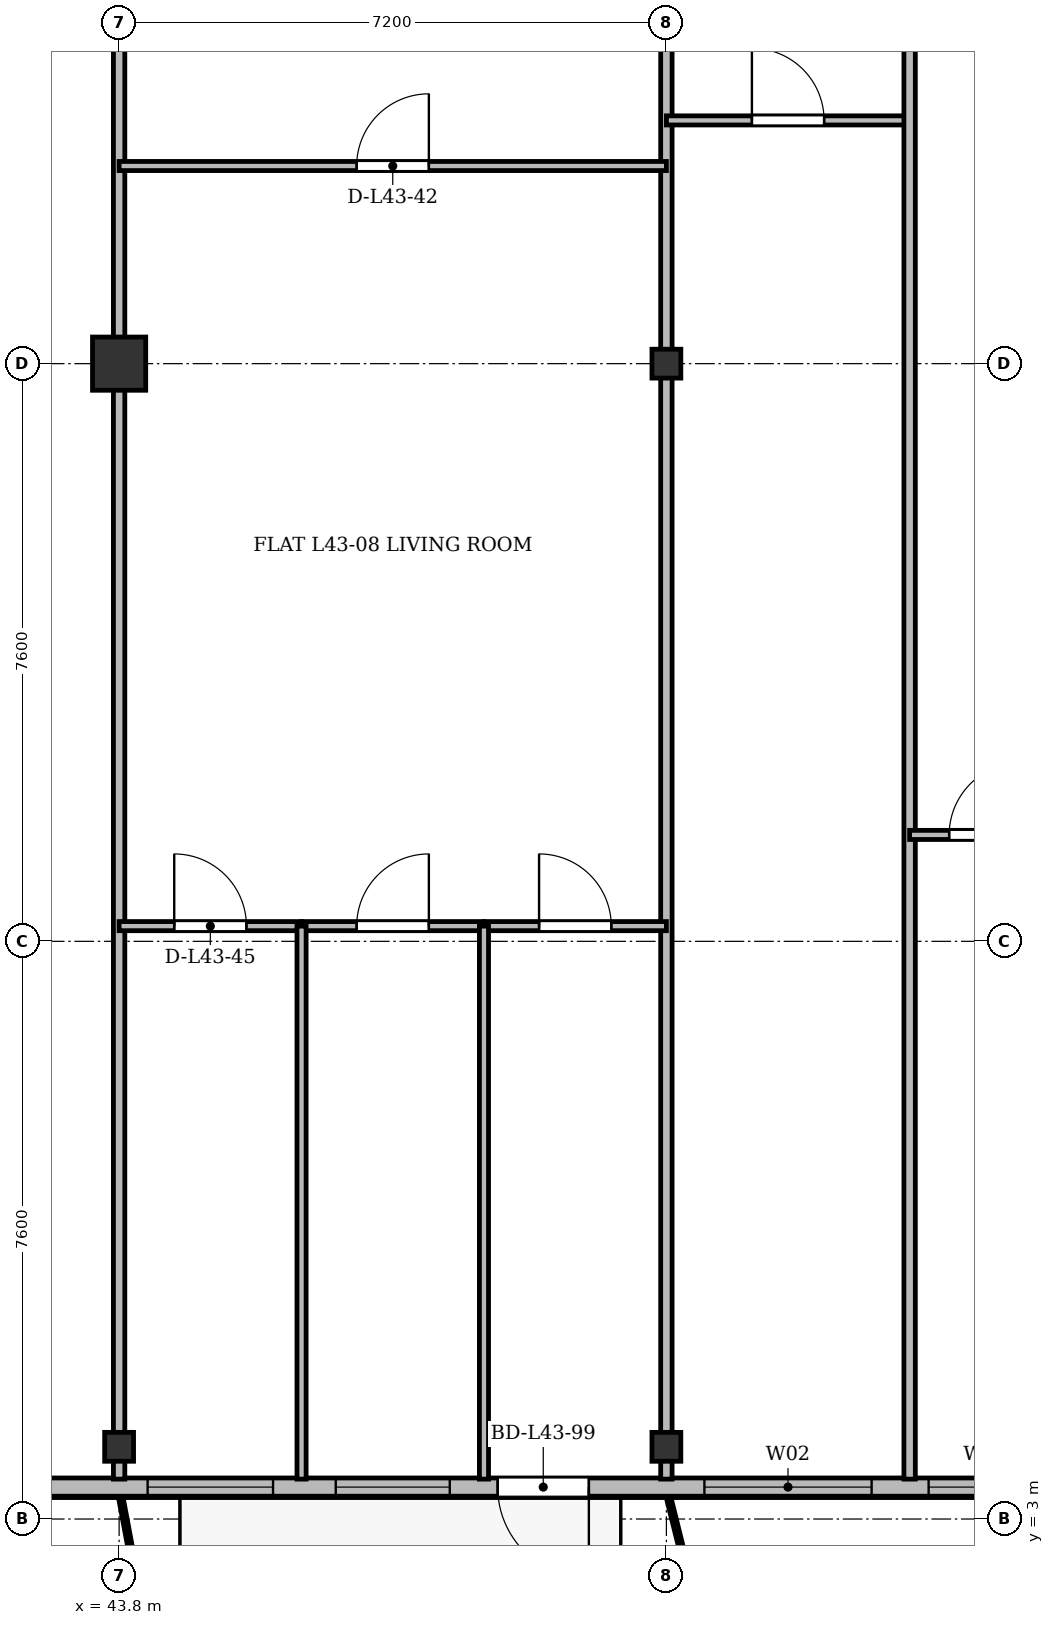
"""IFC4 building model, lengths in metres.
Left out: names, types, materials, properties, quantities, classifications, styles, units other than length and angle.
Written with IfcOpenShell. Run it as: python <this file> out.ifc"""

import sys

from ifc_helpers import new_model, si_unit, direction, frame, frame_2d, origin, origin_2d, place, context, subcontext, project, spatial, rectangle, i_section, extrude, source, transform, mapped, element, fill, save


model = new_model("IFC4")
c1 = context("Model", 3, precision=1e-05, world=origin(), true_north=direction((0.0, 1.0)))
c2 = subcontext(c1, "Body", "Model", "MODEL_VIEW")
j1 = project(units=[si_unit("LENGTHUNIT", "METRE"), si_unit("PLANEANGLEUNIT", "RADIAN")], contexts=[c1])
p1 = place(None, origin())
s1 = spatial("IfcSite", under=j1, at=p1, CompositionType="ELEMENT")
p2 = place(p1, origin())
s2 = spatial("IfcBuilding", under=s1, at=p2, CompositionType="ELEMENT")
p3 = place(p2, frame((0.0, 0.0, 164.5)))
s3 = spatial("IfcBuildingStorey", under=s2, at=p3, CompositionType="ELEMENT", Elevation=164.5)
m1 = source(origin(), c2, "Body", "SweptSolid", [
    extrude(i_section(OverallWidth=0.38, OverallDepth=0.38, WebThickness=0.02, FlangeThickness=0.03, at=origin_2d()), origin(), (0.0, 0.0, 1.0), 3.6),
])
p4 = place(p3, frame((43.8, 3.95, 0.0), z_axis=(0.0, 0.0, 1.0), x_axis=(1.0, 0.0, 0.0)))
e1 = element("IfcColumn", 1, at=p4, inside=s3, PredefinedType="COLUMN", context=c2, shape_type="MappedRepresentation", body=[
    mapped(m1, transform((0.0, 0.0, 0.0), x_axis=(1.0, 0.0, 0.0), y_axis=(0.0, 1.0, 0.0), z_axis=(0.0, 0.0, 1.0), scale=1.0)),
])
m2 = source(origin(), c2, "Body", "SweptSolid", [
    extrude(rectangle(XDim=0.7, YDim=0.7, at=origin_2d()), origin(), (0.0, 0.0, 1.0), 3.6),
])
p5 = place(p3, frame((43.8, 18.2, 0.0), z_axis=(0.0, 0.0, 1.0), x_axis=(1.0, 0.0, 0.0)))
e2 = element("IfcColumn", 2, at=p5, inside=s3, PredefinedType="COLUMN", context=c2, shape_type="MappedRepresentation", body=[
    mapped(m2, transform((0.0, 0.0, 0.0), x_axis=(1.0, 0.0, 0.0), y_axis=(0.0, 1.0, 0.0), z_axis=(0.0, 0.0, 1.0), scale=1.0)),
])
for number, where, z_axis, x_axis in (
    (3, (51.0, 3.95, 0.0), (0.0, 0.0, 1.0), (1.0, 0.0, 0.0)),
    (4, (51.0, 18.2, 0.0), (0.0, 0.0, 1.0), (1.0, 0.0, 0.0)),
):
    element("IfcColumn", number, at=place(p3, frame(where, z_axis=z_axis, x_axis=x_axis)), inside=s3, PredefinedType="COLUMN", context=c2, shape_type="MappedRepresentation", body=[
        mapped(m1, transform((0.0, 0.0, 0.0), x_axis=(1.0, 0.0, 0.0), y_axis=(0.0, 1.0, 0.0), z_axis=(0.0, 0.0, 1.0), scale=1.0)),
    ])
p6 = place(p3, frame((63.6, 3.42, 0.0), z_axis=(0.0, 0.0, 1.0), x_axis=(-1.0, 0.0, 0.0)))
e5 = element("IfcWall", 5, at=p6, inside=s3, PredefinedType="SOLIDWALL", context=c2, shape_type="SweptSolid", body=[
    extrude(rectangle(XDim=52.8, YDim=0.24, at=frame_2d((26.4, 0.0))), origin(), (0.0, 0.0, 1.0), 3.35),
])
p7 = place(p6, frame((1.445, 0.0, 0.9)))
e6 = element("IfcOpeningElement", 6, at=p7, cuts=e5, PredefinedType="OPENING", context=c2, shape_type="SweptSolid", body=[
    extrude(rectangle(XDim=2.0, YDim=1.95, at=frame_2d((1.0, 0.975))), frame((0.0, 0.13, 0.0), z_axis=(0.0, -1.0, 0.0), x_axis=(1.0, 0.0, 0.0)), (0.0, 0.0, 1.0), 0.26),
])
p8 = place(p6, frame((5.275, 0.0, 0.9)))
e7 = element("IfcOpeningElement", 7, at=p8, cuts=e5, PredefinedType="OPENING", context=c2, shape_type="SweptSolid", body=[
    extrude(rectangle(XDim=1.65, YDim=1.85, at=frame_2d((0.825, 0.925))), frame((0.0, 0.13, 0.0), z_axis=(0.0, -1.0, 0.0), x_axis=(1.0, 0.0, 0.0)), (0.0, 0.0, 1.0), 0.26),
])
p9 = place(p6, frame((7.65, 0.0, 0.9)))
e8 = element("IfcOpeningElement", 8, at=p9, cuts=e5, PredefinedType="OPENING", context=c2, shape_type="SweptSolid", body=[
    extrude(rectangle(XDim=1.5, YDim=1.75, at=frame_2d((0.75, 0.875))), frame((0.0, 0.13, 0.0), z_axis=(0.0, -1.0, 0.0), x_axis=(1.0, 0.0, 0.0)), (0.0, 0.0, 1.0), 0.26),
])
p10 = place(p6, frame((9.9, 0.0, 0.9)))
e9 = element("IfcOpeningElement", 9, at=p10, cuts=e5, PredefinedType="OPENING", context=c2, shape_type="SweptSolid", body=[
    extrude(rectangle(XDim=2.2, YDim=1.8, at=frame_2d((1.1, 0.9))), frame((0.0, 0.13, 0.0), z_axis=(0.0, -1.0, 0.0), x_axis=(1.0, 0.0, 0.0)), (0.0, 0.0, 1.0), 0.26),
])
p11 = place(p6, frame((13.62, 0.0, 0.0)))
e10 = element("IfcOpeningElement", 10, at=p11, cuts=e5, PredefinedType="OPENING", context=c2, shape_type="SweptSolid", body=[
    extrude(rectangle(XDim=1.2, YDim=2.2, at=frame_2d((0.6, 1.1))), frame((0.0, 0.13, 0.0), z_axis=(0.0, -1.0, 0.0), x_axis=(1.0, 0.0, 0.0)), (0.0, 0.0, 1.0), 0.26),
])
p12 = place(p6, frame((15.45, 0.0, 0.9)))
e11 = element("IfcOpeningElement", 11, at=p12, cuts=e5, PredefinedType="OPENING", context=c2, shape_type="SweptSolid", body=[
    extrude(rectangle(XDim=1.5, YDim=1.75, at=frame_2d((0.75, 0.875))), frame((0.0, 0.13, 0.0), z_axis=(0.0, -1.0, 0.0), x_axis=(1.0, 0.0, 0.0)), (0.0, 0.0, 1.0), 0.26),
])
p13 = place(p6, frame((17.775, 0.0, 0.9)))
e12 = element("IfcOpeningElement", 12, at=p13, cuts=e5, PredefinedType="OPENING", context=c2, shape_type="SweptSolid", body=[
    extrude(rectangle(XDim=1.65, YDim=1.85, at=frame_2d((0.825, 0.925))), frame((0.0, 0.13, 0.0), z_axis=(0.0, -1.0, 0.0), x_axis=(1.0, 0.0, 0.0)), (0.0, 0.0, 1.0), 0.26),
])
p14 = place(p6, frame((22.2, 0.0, 0.9)))
e13 = element("IfcOpeningElement", 13, at=p14, cuts=e5, PredefinedType="OPENING", context=c2, shape_type="SweptSolid", body=[
    extrude(rectangle(XDim=1.8, YDim=1.8, at=frame_2d((0.9, 0.9))), frame((0.0, 0.13, 0.0), z_axis=(0.0, -1.0, 0.0), x_axis=(1.0, 0.0, 0.0)), (0.0, 0.0, 1.0), 0.26),
])
p15 = place(p6, frame((28.6, 0.0, 0.9)))
e14 = element("IfcOpeningElement", 14, at=p15, cuts=e5, PredefinedType="OPENING", context=c2, shape_type="SweptSolid", body=[
    extrude(rectangle(XDim=2.2, YDim=1.8, at=frame_2d((1.1, 0.9))), frame((0.0, 0.13, 0.0), z_axis=(0.0, -1.0, 0.0), x_axis=(1.0, 0.0, 0.0)), (0.0, 0.0, 1.0), 0.26),
])
p16 = place(p6, frame((35.85, 0.0, 0.9)))
e15 = element("IfcOpeningElement", 15, at=p16, cuts=e5, PredefinedType="OPENING", context=c2, shape_type="SweptSolid", body=[
    extrude(rectangle(XDim=1.5, YDim=1.75, at=frame_2d((0.75, 0.875))), frame((0.0, 0.13, 0.0), z_axis=(0.0, -1.0, 0.0), x_axis=(1.0, 0.0, 0.0)), (0.0, 0.0, 1.0), 0.26),
])
p17 = place(p6, frame((41.656, 0.0, 0.0)))
e16 = element("IfcOpeningElement", 16, at=p17, cuts=e5, PredefinedType="OPENING", context=c2, shape_type="SweptSolid", body=[
    extrude(rectangle(XDim=1.2, YDim=2.2, at=frame_2d((0.6, 1.1))), frame((0.0, 0.13, 0.0), z_axis=(0.0, -1.0, 0.0), x_axis=(1.0, 0.0, 0.0)), (0.0, 0.0, 1.0), 0.26),
])
p18 = place(p6, frame((43.65, 0.0, 0.9)))
e17 = element("IfcOpeningElement", 17, at=p18, cuts=e5, PredefinedType="OPENING", context=c2, shape_type="SweptSolid", body=[
    extrude(rectangle(XDim=1.5, YDim=1.75, at=frame_2d((0.75, 0.875))), frame((0.0, 0.13, 0.0), z_axis=(0.0, -1.0, 0.0), x_axis=(1.0, 0.0, 0.0)), (0.0, 0.0, 1.0), 0.26),
])
p19 = place(p6, frame((45.8, 0.0, 0.9)))
e18 = element("IfcOpeningElement", 18, at=p19, cuts=e5, PredefinedType="OPENING", context=c2, shape_type="SweptSolid", body=[
    extrude(rectangle(XDim=1.8, YDim=1.8, at=frame_2d((0.9, 0.9))), frame((0.0, 0.13, 0.0), z_axis=(0.0, -1.0, 0.0), x_axis=(1.0, 0.0, 0.0)), (0.0, 0.0, 1.0), 0.26),
])
p20 = place(p6, frame((49.255, 0.0, 0.9)))
e19 = element("IfcOpeningElement", 19, at=p20, cuts=e5, PredefinedType="OPENING", context=c2, shape_type="SweptSolid", body=[
    extrude(rectangle(XDim=2.2, YDim=1.8, at=frame_2d((1.1, 0.9))), frame((0.0, 0.13, 0.0), z_axis=(0.0, -1.0, 0.0), x_axis=(1.0, 0.0, 0.0)), (0.0, 0.0, 1.0), 0.26),
])
for number, where, z_axis, x_axis in (
    (20, (43.8, 3.525, 0.0), (0.0, 0.0, 1.0), (0.0, 1.0, 0.0)),
    (21, (51.0, 3.525, 0.0), (0.0, 0.0, 1.0), (0.0, 1.0, 0.0)),
):
    element("IfcWall", number, at=place(p3, frame(where, z_axis=z_axis, x_axis=x_axis)), inside=s3, PredefinedType="PARTITIONING", context=c2, shape_type="SweptSolid", body=[
        extrude(rectangle(XDim=27.275, YDim=0.15, at=frame_2d((13.638, 0.0))), origin(), (0.0, 0.0, 1.0), 2.85),
    ])
p21 = place(p3, frame((43.8, 20.8, 0.0), z_axis=(0.0, 0.0, 1.0), x_axis=(1.0, 0.0, 0.0)))
e22 = element("IfcWall", 22, at=p21, inside=s3, PredefinedType="PARTITIONING", context=c2, shape_type="SweptSolid", body=[
    extrude(rectangle(XDim=7.2, YDim=0.12, at=frame_2d((3.6, 0.0))), origin(), (0.0, 0.0, 1.0), 2.85),
])
p22 = place(p21, frame((3.125, 0.0, 0.0)))
e23 = element("IfcOpeningElement", 23, at=p22, cuts=e22, PredefinedType="OPENING", context=c2, shape_type="SweptSolid", body=[
    extrude(rectangle(XDim=0.95, YDim=2.15, at=frame_2d((0.475, 1.075))), frame((0.0, 0.07, 0.0), z_axis=(0.0, -1.0, 0.0), x_axis=(1.0, 0.0, 0.0)), (0.0, 0.0, 1.0), 0.14),
])
p23 = place(p3, frame((43.8, 10.8, 0.0), z_axis=(0.0, 0.0, 1.0), x_axis=(1.0, 0.0, 0.0)))
e24 = element("IfcWall", 24, at=p23, inside=s3, PredefinedType="PARTITIONING", context=c2, shape_type="SweptSolid", body=[
    extrude(rectangle(XDim=2.4, YDim=0.12, at=frame_2d((1.2, 0.0))), origin(), (0.0, 0.0, 1.0), 2.85),
])
p24 = place(p23, frame((0.725, 0.0, 0.0)))
e25 = element("IfcOpeningElement", 25, at=p24, cuts=e24, PredefinedType="OPENING", context=c2, shape_type="SweptSolid", body=[
    extrude(rectangle(XDim=0.95, YDim=2.15, at=frame_2d((0.475, 1.075))), frame((0.0, 0.07, 0.0), z_axis=(0.0, -1.0, 0.0), x_axis=(1.0, 0.0, 0.0)), (0.0, 0.0, 1.0), 0.14),
])
p25 = place(p3, frame((46.2, 10.8, 0.0), z_axis=(0.0, 0.0, 1.0), x_axis=(1.0, 0.0, 0.0)))
e26 = element("IfcWall", 26, at=p25, inside=s3, PredefinedType="PARTITIONING", context=c2, shape_type="SweptSolid", body=[
    extrude(rectangle(XDim=2.4, YDim=0.12, at=frame_2d((1.2, 0.0))), origin(), (0.0, 0.0, 1.0), 3.0),
])
p26 = place(p25, frame((0.725, 0.0, 0.0)))
e27 = element("IfcOpeningElement", 27, at=p26, cuts=e26, PredefinedType="OPENING", context=c2, shape_type="SweptSolid", body=[
    extrude(rectangle(XDim=0.95, YDim=2.15, at=frame_2d((0.475, 1.075))), frame((0.0, 0.07, 0.0), z_axis=(0.0, -1.0, 0.0), x_axis=(1.0, 0.0, 0.0)), (0.0, 0.0, 1.0), 0.14),
])
p27 = place(p3, frame((46.2, 3.525, 0.0), z_axis=(0.0, 0.0, 1.0), x_axis=(0.0, 1.0, 0.0)))
e28 = element("IfcWall", 28, at=p27, inside=s3, PredefinedType="PARTITIONING", context=c2, shape_type="SweptSolid", body=[
    extrude(rectangle(XDim=7.275, YDim=0.12, at=frame_2d((3.638, 0.0))), origin(), (0.0, 0.0, 1.0), 2.75),
])
p28 = place(p3, frame((48.6, 10.8, 0.0), z_axis=(0.0, 0.0, 1.0), x_axis=(1.0, 0.0, 0.0)))
e29 = element("IfcWall", 29, at=p28, inside=s3, PredefinedType="PARTITIONING", context=c2, shape_type="SweptSolid", body=[
    extrude(rectangle(XDim=2.4, YDim=0.12, at=frame_2d((1.2, 0.0))), origin(), (0.0, 0.0, 1.0), 2.85),
])
p29 = place(p28, frame((0.725, 0.0, 0.0)))
e30 = element("IfcOpeningElement", 30, at=p29, cuts=e29, PredefinedType="OPENING", context=c2, shape_type="SweptSolid", body=[
    extrude(rectangle(XDim=0.95, YDim=2.15, at=frame_2d((0.475, 1.075))), frame((0.0, 0.07, 0.0), z_axis=(0.0, -1.0, 0.0), x_axis=(1.0, 0.0, 0.0)), (0.0, 0.0, 1.0), 0.14),
])
p30 = place(p3, frame((48.6, 3.525, 0.0), z_axis=(0.0, 0.0, 1.0), x_axis=(0.0, 1.0, 0.0)))
e31 = element("IfcWall", 31, at=p30, inside=s3, PredefinedType="PARTITIONING", context=c2, shape_type="SweptSolid", body=[
    extrude(rectangle(XDim=7.275, YDim=0.12, at=frame_2d((3.638, 0.0))), origin(), (0.0, 0.0, 1.0), 2.75),
])
p31 = place(p3, frame((51.0, 21.4, 0.0), z_axis=(0.0, 0.0, 1.0), x_axis=(1.0, 0.0, 0.0)))
e32 = element("IfcWall", 32, at=p31, inside=s3, PredefinedType="PARTITIONING", context=c2, shape_type="SweptSolid", body=[
    extrude(rectangle(XDim=3.2, YDim=0.12, at=frame_2d((1.6, 0.0))), origin(), (0.0, 0.0, 1.0), 2.85),
])
p32 = place(p31, frame((1.125, 0.0, 0.0)))
e33 = element("IfcOpeningElement", 33, at=p32, cuts=e32, PredefinedType="OPENING", context=c2, shape_type="SweptSolid", body=[
    extrude(rectangle(XDim=0.95, YDim=2.15, at=frame_2d((0.475, 1.075))), frame((0.0, 0.07, 0.0), z_axis=(0.0, -1.0, 0.0), x_axis=(1.0, 0.0, 0.0)), (0.0, 0.0, 1.0), 0.14),
])
p33 = place(p3, frame((54.2, 3.525, 0.0), z_axis=(0.0, 0.0, 1.0), x_axis=(0.0, 1.0, 0.0)))
e34 = element("IfcWall", 34, at=p33, inside=s3, PredefinedType="PARTITIONING", context=c2, shape_type="SweptSolid", body=[
    extrude(rectangle(XDim=27.275, YDim=0.15, at=frame_2d((13.638, 0.0))), origin(), (0.0, 0.0, 1.0), 2.75),
])
p34 = place(p3, frame((54.2, 12.0, 0.0), z_axis=(0.0, 0.0, 1.0), x_axis=(1.0, 0.0, 0.0)))
e35 = element("IfcWall", 35, at=p34, inside=s3, PredefinedType="PARTITIONING", context=c2, shape_type="SweptSolid", body=[
    extrude(rectangle(XDim=2.0, YDim=0.12, at=frame_2d((1.0, 0.0))), origin(), (0.0, 0.0, 1.0), 3.35),
])
p35 = place(p34, frame((0.52, 0.0, 0.0)))
e36 = element("IfcOpeningElement", 36, at=p35, cuts=e35, PredefinedType="OPENING", context=c2, shape_type="SweptSolid", body=[
    extrude(rectangle(XDim=0.95, YDim=2.15, at=frame_2d((0.475, 1.075))), frame((0.0, 0.07, 0.0), z_axis=(0.0, -1.0, 0.0), x_axis=(1.0, 0.0, 0.0)), (0.0, 0.0, 1.0), 0.14),
])
m3 = source(origin(), c2, "Body", "SweptSolid", [
    extrude(rectangle(XDim=1.5, YDim=1.75, at=frame_2d((0.75, 0.875))), frame((0.0, 0.03, 0.0), z_axis=(0.0, -1.0, 0.0), x_axis=(1.0, 0.0, 0.0)), (0.0, 0.0, 1.0), 0.06),
])
p36 = place(p9, origin())
e37 = element("IfcWindow", 37, at=p36, inside=s3, PartitioningType="SINGLE_PANEL", PredefinedType="WINDOW", context=c2, shape_type="MappedRepresentation", body=[
    mapped(m3, transform((0.0, 0.0, 0.0), x_axis=(1.0, 0.0, 0.0), y_axis=(0.0, 1.0, 0.0), z_axis=(0.0, 0.0, 1.0), scale=1.0)),
])
fill(e8, e37)
m4 = source(origin(), c2, "Body", "SweptSolid", [
    extrude(rectangle(XDim=2.2, YDim=1.8, at=frame_2d((1.1, 0.9))), frame((0.0, 0.03, 0.0), z_axis=(0.0, -1.0, 0.0), x_axis=(1.0, 0.0, 0.0)), (0.0, 0.0, 1.0), 0.06),
])
p37 = place(p10, origin())
e38 = element("IfcWindow", 38, at=p37, inside=s3, PartitioningType="SINGLE_PANEL", PredefinedType="WINDOW", context=c2, shape_type="MappedRepresentation", body=[
    mapped(m4, transform((0.0, 0.0, 0.0), x_axis=(1.0, 0.0, 0.0), y_axis=(0.0, 1.0, 0.0), z_axis=(0.0, 0.0, 1.0), scale=1.0)),
])
fill(e9, e38)
m5 = source(origin(), c2, "Body", "SweptSolid", [
    extrude(rectangle(XDim=1.2, YDim=2.2, at=frame_2d((0.6, 1.1))), frame((0.0, 0.025, 0.0), z_axis=(0.0, -1.0, 0.0), x_axis=(1.0, 0.0, 0.0)), (0.0, 0.0, 1.0), 0.05),
])
p38 = place(p11, origin())
e39 = element("IfcDoor", 39, at=p38, inside=s3, OperationType="SINGLE_SWING_LEFT", PredefinedType="DOOR", context=c2, shape_type="MappedRepresentation", body=[
    mapped(m5, transform((0.0, 0.0, 0.0), x_axis=(1.0, 0.0, 0.0), y_axis=(0.0, 1.0, 0.0), z_axis=(0.0, 0.0, 1.0), scale=1.0)),
])
fill(e10, e39)
p39 = place(p12, origin())
e40 = element("IfcWindow", 40, at=p39, inside=s3, PartitioningType="SINGLE_PANEL", PredefinedType="WINDOW", context=c2, shape_type="MappedRepresentation", body=[
    mapped(m3, transform((0.0, 0.0, 0.0), x_axis=(1.0, 0.0, 0.0), y_axis=(0.0, 1.0, 0.0), z_axis=(0.0, 0.0, 1.0), scale=1.0)),
])
fill(e11, e40)
m6 = source(origin(), c2, "Body", "SweptSolid", [
    extrude(rectangle(XDim=1.65, YDim=1.85, at=frame_2d((0.825, 0.925))), frame((0.0, 0.03, 0.0), z_axis=(0.0, -1.0, 0.0), x_axis=(1.0, 0.0, 0.0)), (0.0, 0.0, 1.0), 0.06),
])
p40 = place(p13, origin())
e41 = element("IfcWindow", 41, at=p40, inside=s3, PartitioningType="SINGLE_PANEL", PredefinedType="WINDOW", context=c2, shape_type="MappedRepresentation", body=[
    mapped(m6, transform((0.0, 0.0, 0.0), x_axis=(1.0, 0.0, 0.0), y_axis=(0.0, 1.0, 0.0), z_axis=(0.0, 0.0, 1.0), scale=1.0)),
])
fill(e12, e41)
m7 = source(origin(), c2, "Body", "SweptSolid", [
    extrude(rectangle(XDim=0.95, YDim=2.15, at=frame_2d((0.475, 1.075))), frame((0.0, 0.025, 0.0), z_axis=(0.0, -1.0, 0.0), x_axis=(1.0, 0.0, 0.0)), (0.0, 0.0, 1.0), 0.05),
])
p41 = place(p22, origin())
e42 = element("IfcDoor", 42, at=p41, inside=s3, OperationType="SINGLE_SWING_RIGHT", PredefinedType="DOOR", context=c2, shape_type="MappedRepresentation", body=[
    mapped(m7, transform((0.0, 0.0, 0.0), x_axis=(1.0, 0.0, 0.0), y_axis=(0.0, 1.0, 0.0), z_axis=(0.0, 0.0, 1.0), scale=1.0)),
])
fill(e23, e42)
p42 = place(p24, origin())
e43 = element("IfcDoor", 43, at=p42, inside=s3, OperationType="SINGLE_SWING_LEFT", PredefinedType="DOOR", context=c2, shape_type="MappedRepresentation", body=[
    mapped(m7, transform((0.0, 0.0, 0.0), x_axis=(1.0, 0.0, 0.0), y_axis=(0.0, 1.0, 0.0), z_axis=(0.0, 0.0, 1.0), scale=1.0)),
])
fill(e25, e43)
p43 = place(p26, origin())
e44 = element("IfcDoor", 44, at=p43, inside=s3, OperationType="SINGLE_SWING_RIGHT", PredefinedType="DOOR", context=c2, shape_type="MappedRepresentation", body=[
    mapped(m7, transform((0.0, 0.0, 0.0), x_axis=(1.0, 0.0, 0.0), y_axis=(0.0, 1.0, 0.0), z_axis=(0.0, 0.0, 1.0), scale=1.0)),
])
fill(e27, e44)
p44 = place(p29, origin())
e45 = element("IfcDoor", 45, at=p44, inside=s3, OperationType="SINGLE_SWING_LEFT", PredefinedType="DOOR", context=c2, shape_type="MappedRepresentation", body=[
    mapped(m7, transform((0.0, 0.0, 0.0), x_axis=(1.0, 0.0, 0.0), y_axis=(0.0, 1.0, 0.0), z_axis=(0.0, 0.0, 1.0), scale=1.0)),
])
fill(e30, e45)
p45 = place(p32, origin())
e46 = element("IfcDoor", 46, at=p45, inside=s3, OperationType="SINGLE_SWING_LEFT", PredefinedType="DOOR", context=c2, shape_type="MappedRepresentation", body=[
    mapped(m7, transform((0.0, 0.0, 0.0), x_axis=(1.0, 0.0, 0.0), y_axis=(0.0, 1.0, 0.0), z_axis=(0.0, 0.0, 1.0), scale=1.0)),
])
fill(e33, e46)
p46 = place(p35, origin())
e47 = element("IfcDoor", 47, at=p46, inside=s3, OperationType="SINGLE_SWING_RIGHT", PredefinedType="DOOR", context=c2, shape_type="MappedRepresentation", body=[
    mapped(m7, transform((0.0, 0.0, 0.0), x_axis=(1.0, 0.0, 0.0), y_axis=(0.0, 1.0, 0.0), z_axis=(0.0, 0.0, 1.0), scale=1.0)),
])
fill(e36, e47)
save(model, sys.argv[1])
